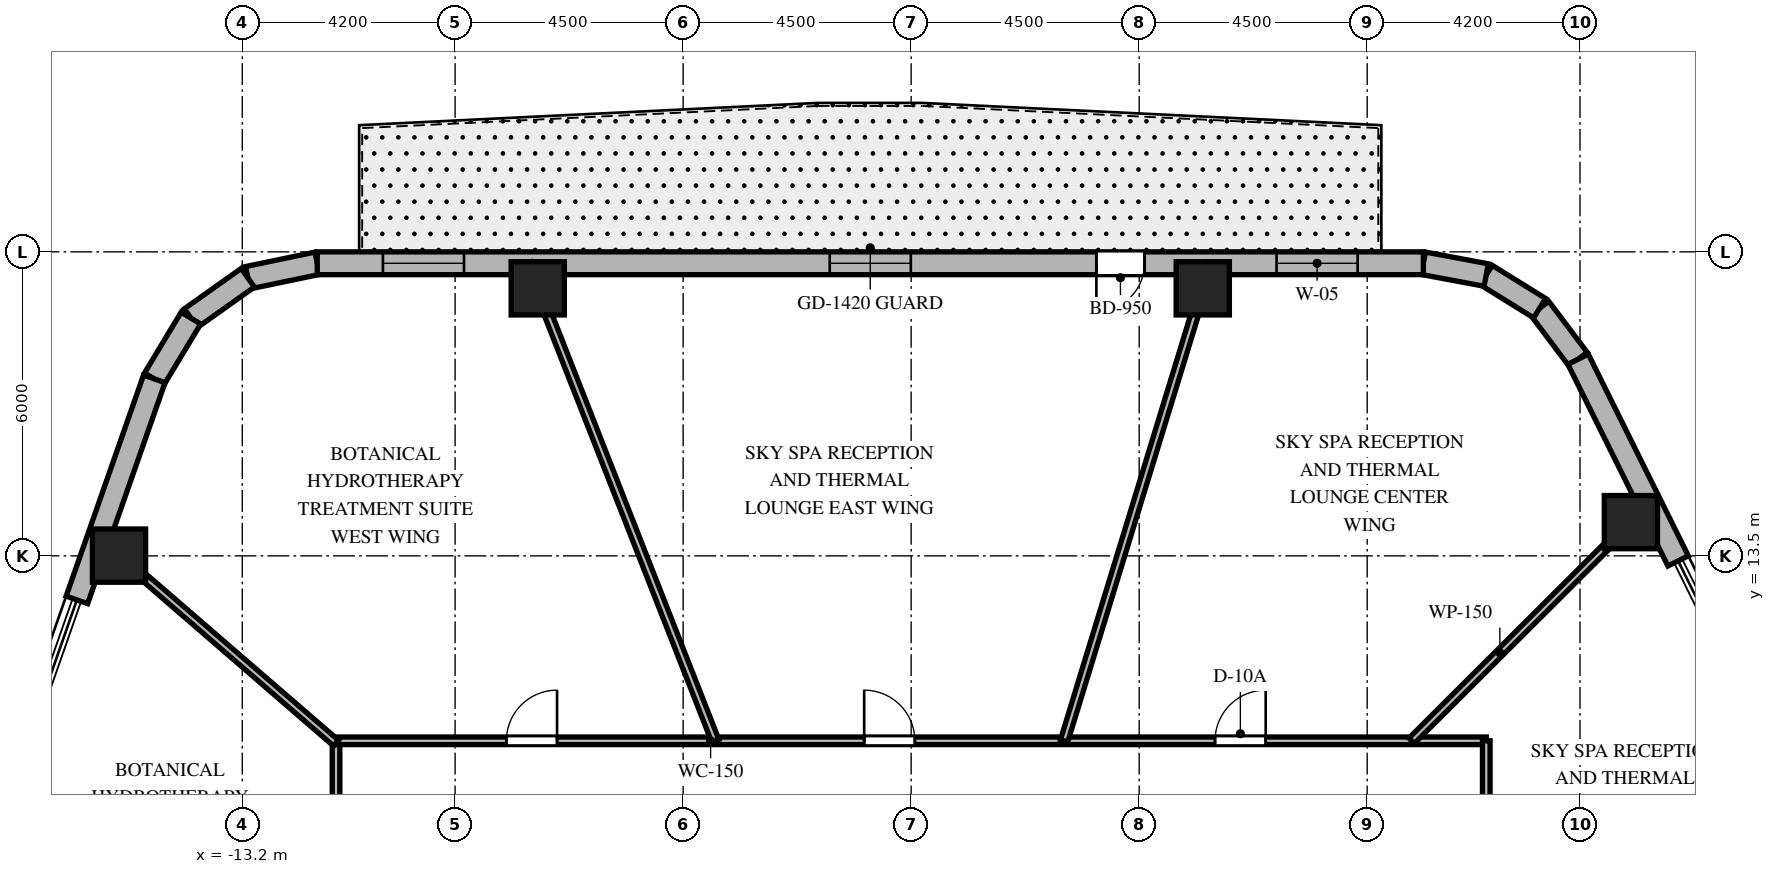
"""IFC4 building model, lengths in metres.
Left out: names, types, materials, properties, quantities, classifications, styles, units other than length and angle.
Written with IfcOpenShell. Run it as: python <this file> out.ifc"""

import sys

from ifc_helpers import new_model, si_unit, direction, frame, frame_2d, origin, origin_2d, place, context, subcontext, project, spatial, rectangle, extrude, element, fill, save


model = new_model("IFC4")
c1 = context("Model", 3, precision=1e-05, world=origin(), true_north=direction((0.0, 1.0)))
c2 = subcontext(c1, "Body", "Model", "MODEL_VIEW")
j1 = project(units=[si_unit("LENGTHUNIT", "METRE"), si_unit("PLANEANGLEUNIT", "RADIAN")], contexts=[c1])
p1 = place(None, origin())
s1 = spatial("IfcSite", under=j1, at=p1, CompositionType="ELEMENT")
p2 = place(p1, origin())
s2 = spatial("IfcBuilding", under=s1, at=p2, CompositionType="ELEMENT")
p3 = place(p2, frame((0.0, 0.0, 201.5)))
s3 = spatial("IfcBuildingStorey", under=s2, at=p3, CompositionType="ELEMENT", Elevation=201.5)
for number, where, z_axis, x_axis in (
    (1, (14.204, 14.166, 0.0), (0.0, 0.0, 1.0), (1.0, 0.0, 0.0)),
    (2, (5.755, 18.78, 0.0), (0.0, 0.0, 1.0), (1.0, 0.0, 0.0)),
    (3, (-7.369, 18.78, 0.0), (0.0, 0.0, 1.0), (1.0, 0.0, 0.0)),
    (4, (-15.633, 13.505, 0.0), (0.0, 0.0, 1.0), (1.0, 0.0, 0.0)),
):
    element("IfcColumn", number, at=place(p3, frame(where, z_axis=z_axis, x_axis=x_axis)), inside=s3, PredefinedType="COLUMN", context=c2, shape_type="SweptSolid", body=[
        extrude(rectangle(XDim=1.05, YDim=1.05, at=origin_2d()), origin(), (0.0, 0.0, 1.0), 5.0),
    ])
p4 = place(p3, frame((13.162, 17.381, 0.0), z_axis=(0.0, 0.0, 1.0), x_axis=(-0.601515770517, 0.798860925205, 0.0)))
e5 = element("IfcWall", 5, at=p4, inside=s3, PredefinedType="SOLIDWALL", context=c2, shape_type="SweptSolid", body=[
    extrude(rectangle(XDim=1.262, YDim=0.45, at=frame_2d((0.631, 0.0))), origin(), (0.0, 0.0, 1.0), 4.7),
])
p5 = place(p3, frame((12.403, 18.389, 0.0), z_axis=(0.0, 0.0, 1.0), x_axis=(-0.849795170926, 0.527113049991, 0.0)))
e6 = element("IfcWall", 6, at=p5, inside=s3, PredefinedType="SOLIDWALL", context=c2, shape_type="SweptSolid", body=[
    extrude(rectangle(XDim=1.241, YDim=0.45, at=frame_2d((0.62, 0.0))), origin(), (0.0, 0.0, 1.0), 4.7),
])
p6 = place(p3, frame((11.349, 19.043, 0.0), z_axis=(0.0, 0.0, 1.0), x_axis=(-0.982931267051, 0.183973161772, 0.0)))
e7 = element("IfcWall", 7, at=p6, inside=s3, PredefinedType="SOLIDWALL", context=c2, shape_type="SweptSolid", body=[
    extrude(rectangle(XDim=1.262, YDim=0.45, at=frame_2d((0.631, 0.0))), origin(), (0.0, 0.0, 1.0), 4.7),
])
p7 = place(p3, frame((-11.72, 19.275, 0.0), z_axis=(0.0, 0.0, 1.0), x_axis=(-0.97893106758, -0.204191001093, 0.0)))
e8 = element("IfcWall", 8, at=p7, inside=s3, PredefinedType="SOLIDWALL", context=c2, shape_type="SweptSolid", body=[
    extrude(rectangle(XDim=1.4, YDim=0.45, at=frame_2d((0.7, 0.0))), origin(), (0.0, 0.0, 1.0), 4.7),
])
p8 = place(p3, frame((-13.091, 18.989, 0.0), z_axis=(0.0, 0.0, 1.0), x_axis=(-0.815574637848, -0.578651890258, 0.0)))
e9 = element("IfcWall", 9, at=p8, inside=s3, PredefinedType="SOLIDWALL", context=c2, shape_type="SweptSolid", body=[
    extrude(rectangle(XDim=1.377, YDim=0.45, at=frame_2d((0.688, 0.0))), origin(), (0.0, 0.0, 1.0), 4.7),
])
p9 = place(p3, frame((-14.214, 18.192, 0.0), z_axis=(0.0, 0.0, 1.0), x_axis=(-0.516340945502, -0.856383108193, 0.0)))
e10 = element("IfcWall", 10, at=p9, inside=s3, PredefinedType="SOLIDWALL", context=c2, shape_type="SweptSolid", body=[
    extrude(rectangle(XDim=1.4, YDim=0.45, at=frame_2d((0.7, 0.0))), origin(), (0.0, 0.0, 1.0), 4.7),
])
p10 = place(p3, frame((15.136, 13.4, 0.0), z_axis=(0.0, 0.0, 1.0), x_axis=(-0.444243648127, 0.895906011308, 0.0)))
e11 = element("IfcWall", 11, at=p10, inside=s3, PredefinedType="SOLIDWALL", context=c2, shape_type="SweptSolid", body=[
    extrude(rectangle(XDim=4.443, YDim=0.45, at=frame_2d((2.221, 0.0))), origin(), (0.0, 0.0, 1.0), 4.7),
])
p11 = place(p3, frame((10.108, 19.275, 0.0), z_axis=(0.0, 0.0, 1.0), x_axis=(-1.0, 0.0, 0.0)))
e12 = element("IfcWall", 12, at=p11, inside=s3, PredefinedType="SOLIDWALL", context=c2, shape_type="SweptSolid", body=[
    extrude(rectangle(XDim=21.829, YDim=0.45, at=frame_2d((10.915, 0.0))), origin(), (0.0, 0.0, 1.0), 4.7),
])
p12 = place(p11, frame((5.503, 0.0, 0.0)))
e13 = element("IfcOpeningElement", 13, at=p12, cuts=e12, PredefinedType="OPENING", context=c2, shape_type="SweptSolid", body=[
    extrude(rectangle(XDim=0.95, YDim=2.15, at=frame_2d((0.475, 1.075))), frame((0.0, 0.235, 0.0), z_axis=(0.0, -1.0, 0.0), x_axis=(1.0, 0.0, 0.0)), (0.0, 0.0, 1.0), 0.47),
])
p13 = place(p11, frame((1.297, 0.0, 0.8)))
e14 = element("IfcOpeningElement", 14, at=p13, cuts=e12, PredefinedType="OPENING", context=c2, shape_type="SweptSolid", body=[
    extrude(rectangle(XDim=1.6, YDim=1.75, at=frame_2d((0.8, 0.875))), frame((0.0, 0.235, 0.0), z_axis=(0.0, -1.0, 0.0), x_axis=(1.0, 0.0, 0.0)), (0.0, 0.0, 1.0), 0.47),
])
p14 = place(p11, frame((10.115, 0.0, 0.8)))
e15 = element("IfcOpeningElement", 15, at=p14, cuts=e12, PredefinedType="OPENING", context=c2, shape_type="SweptSolid", body=[
    extrude(rectangle(XDim=1.6, YDim=1.75, at=frame_2d((0.8, 0.875))), frame((0.0, 0.235, 0.0), z_axis=(0.0, -1.0, 0.0), x_axis=(1.0, 0.0, 0.0)), (0.0, 0.0, 1.0), 0.47),
])
p15 = place(p11, frame((18.933, 0.0, 0.8)))
e16 = element("IfcOpeningElement", 16, at=p15, cuts=e12, PredefinedType="OPENING", context=c2, shape_type="SweptSolid", body=[
    extrude(rectangle(XDim=1.6, YDim=1.75, at=frame_2d((0.8, 0.875))), frame((0.0, 0.235, 0.0), z_axis=(0.0, -1.0, 0.0), x_axis=(1.0, 0.0, 0.0)), (0.0, 0.0, 1.0), 0.47),
])
p16 = place(p3, frame((-14.937, 16.993, 0.0), z_axis=(0.0, 0.0, 1.0), x_axis=(-0.330437475159, -0.943827884209, 0.0)))
e17 = element("IfcWall", 17, at=p16, inside=s3, PredefinedType="SOLIDWALL", context=c2, shape_type="SweptSolid", body=[
    extrude(rectangle(XDim=4.622, YDim=0.45, at=frame_2d((2.311, 0.0))), origin(), (0.0, 0.0, 1.0), 4.7),
])
p17 = place(p3, frame((-11.35, -9.85, 0.0), z_axis=(0.0, 0.0, 1.0), x_axis=(0.0, 1.0, 0.0)))
e18 = element("IfcWall", 18, at=p17, inside=s3, PredefinedType="PARTITIONING", context=c2, shape_type="SweptSolid", body=[
    extrude(rectangle(XDim=19.7, YDim=0.15, at=frame_2d((9.85, 0.0))), origin(), (0.0, 0.0, 1.0), 2.89),
])
p18 = place(p17, frame((15.183, 0.0, 0.0)))
e19 = element("IfcOpeningElement", 19, at=p18, cuts=e18, PredefinedType="OPENING", context=c2, shape_type="SweptSolid", body=[
    extrude(rectangle(XDim=1.0, YDim=2.03, at=frame_2d((0.5, 1.015))), frame((0.0, 0.085, 0.0), z_axis=(0.0, -1.0, 0.0), x_axis=(1.0, 0.0, 0.0)), (0.0, 0.0, 1.0), 0.17),
])
p19 = place(p17, frame((8.819, 0.0, 0.0)))
e20 = element("IfcOpeningElement", 20, at=p19, cuts=e18, PredefinedType="OPENING", context=c2, shape_type="SweptSolid", body=[
    extrude(rectangle(XDim=1.0, YDim=2.03, at=frame_2d((0.5, 1.015))), frame((0.0, 0.085, 0.0), z_axis=(0.0, -1.0, 0.0), x_axis=(1.0, 0.0, 0.0)), (0.0, 0.0, 1.0), 0.17),
])
p20 = place(p17, frame((2.989, 0.0, 0.0)))
e21 = element("IfcOpeningElement", 21, at=p20, cuts=e18, PredefinedType="OPENING", context=c2, shape_type="SweptSolid", body=[
    extrude(rectangle(XDim=1.0, YDim=2.03, at=frame_2d((0.5, 1.015))), frame((0.0, 0.085, 0.0), z_axis=(0.0, -1.0, 0.0), x_axis=(1.0, 0.0, 0.0)), (0.0, 0.0, 1.0), 0.17),
])
p21 = place(p3, frame((-11.35, 9.85, 0.0), z_axis=(0.0, 0.0, 1.0), x_axis=(1.0, 0.0, 0.0)))
e22 = element("IfcWall", 22, at=p21, inside=s3, PredefinedType="PARTITIONING", context=c2, shape_type="SweptSolid", body=[
    extrude(rectangle(XDim=22.7, YDim=0.15, at=frame_2d((11.35, 0.0))), origin(), (0.0, 0.0, 1.0), 2.89),
])
p22 = place(p21, frame((17.347, 0.0, 0.0)))
e23 = element("IfcOpeningElement", 23, at=p22, cuts=e22, PredefinedType="OPENING", context=c2, shape_type="SweptSolid", body=[
    extrude(rectangle(XDim=1.0, YDim=2.03, at=frame_2d((0.5, 1.015))), frame((0.0, 0.085, 0.0), z_axis=(0.0, -1.0, 0.0), x_axis=(1.0, 0.0, 0.0)), (0.0, 0.0, 1.0), 0.17),
])
p23 = place(p21, frame((10.423, 0.0, 0.0)))
e24 = element("IfcOpeningElement", 24, at=p23, cuts=e22, PredefinedType="OPENING", context=c2, shape_type="SweptSolid", body=[
    extrude(rectangle(XDim=1.0, YDim=2.03, at=frame_2d((0.5, 1.015))), frame((0.0, 0.085, 0.0), z_axis=(0.0, -1.0, 0.0), x_axis=(1.0, 0.0, 0.0)), (0.0, 0.0, 1.0), 0.17),
])
p24 = place(p21, frame((3.362, 0.0, 0.0)))
e25 = element("IfcOpeningElement", 25, at=p24, cuts=e22, PredefinedType="OPENING", context=c2, shape_type="SweptSolid", body=[
    extrude(rectangle(XDim=1.0, YDim=2.03, at=frame_2d((0.5, 1.015))), frame((0.0, 0.085, 0.0), z_axis=(0.0, -1.0, 0.0), x_axis=(1.0, 0.0, 0.0)), (0.0, 0.0, 1.0), 0.17),
])
p25 = place(p3, frame((11.35, 9.85, 0.0), z_axis=(0.0, 0.0, 1.0), x_axis=(0.0, -1.0, 0.0)))
e26 = element("IfcWall", 26, at=p25, inside=s3, PredefinedType="PARTITIONING", context=c2, shape_type="SweptSolid", body=[
    extrude(rectangle(XDim=19.7, YDim=0.15, at=frame_2d((9.85, 0.0))), origin(), (0.0, 0.0, 1.0), 2.89),
])
p26 = place(p25, frame((2.989, 0.0, 0.0)))
e27 = element("IfcOpeningElement", 27, at=p26, cuts=e26, PredefinedType="OPENING", context=c2, shape_type="SweptSolid", body=[
    extrude(rectangle(XDim=1.0, YDim=2.03, at=frame_2d((0.5, 1.015))), frame((0.0, 0.085, 0.0), z_axis=(0.0, -1.0, 0.0), x_axis=(1.0, 0.0, 0.0)), (0.0, 0.0, 1.0), 0.17),
])
p27 = place(p25, frame((15.183, 0.0, 0.0)))
e28 = element("IfcOpeningElement", 28, at=p27, cuts=e26, PredefinedType="OPENING", context=c2, shape_type="SweptSolid", body=[
    extrude(rectangle(XDim=1.0, YDim=2.03, at=frame_2d((0.5, 1.015))), frame((0.0, 0.085, 0.0), z_axis=(0.0, -1.0, 0.0), x_axis=(1.0, 0.0, 0.0)), (0.0, 0.0, 1.0), 0.17),
])
p28 = place(p25, frame((8.819, 0.0, 0.0)))
e29 = element("IfcOpeningElement", 29, at=p28, cuts=e26, PredefinedType="OPENING", context=c2, shape_type="SweptSolid", body=[
    extrude(rectangle(XDim=1.0, YDim=2.03, at=frame_2d((0.5, 1.015))), frame((0.0, 0.085, 0.0), z_axis=(0.0, -1.0, 0.0), x_axis=(1.0, 0.0, 0.0)), (0.0, 0.0, 1.0), 0.17),
])
p29 = place(p3, frame((9.876, 9.85, 0.0), z_axis=(0.0, 0.0, 1.0), x_axis=(0.708044623933, 0.706167692917, 0.0)))
e30 = element("IfcWall", 30, at=p29, inside=s3, PredefinedType="PARTITIONING", context=c2, shape_type="SweptSolid", body=[
    extrude(rectangle(XDim=6.634, YDim=0.15, at=frame_2d((3.317, 0.0))), origin(), (0.0, 0.0, 1.0), 2.89),
])
p30 = place(p3, frame((3.019, 9.85, 0.0), z_axis=(0.0, 0.0, 1.0), x_axis=(0.292996168014, 0.956113615387, 0.0)))
e31 = element("IfcWall", 31, at=p30, inside=s3, PredefinedType="PARTITIONING", context=c2, shape_type="SweptSolid", body=[
    extrude(rectangle(XDim=9.857, YDim=0.15, at=frame_2d((4.929, 0.0))), origin(), (0.0, 0.0, 1.0), 2.89),
])
p31 = place(p3, frame((-3.865, 9.85, 0.0), z_axis=(0.0, 0.0, 1.0), x_axis=(-0.365279308356, 0.930897968033, 0.0)))
e32 = element("IfcWall", 32, at=p31, inside=s3, PredefinedType="PARTITIONING", context=c2, shape_type="SweptSolid", body=[
    extrude(rectangle(XDim=10.125, YDim=0.15, at=frame_2d((5.062, 0.0))), origin(), (0.0, 0.0, 1.0), 2.89),
])
p32 = place(p3, frame((-11.35, 9.805, 0.0), z_axis=(0.0, 0.0, 1.0), x_axis=(-0.75671839422, 0.653740982232, 0.0)))
e33 = element("IfcWall", 33, at=p32, inside=s3, PredefinedType="PARTITIONING", context=c2, shape_type="SweptSolid", body=[
    extrude(rectangle(XDim=6.193, YDim=0.15, at=frame_2d((3.096, 0.0))), origin(), (0.0, 0.0, 1.0), 2.89),
])
p33 = place(p12, origin())
e34 = element("IfcDoor", 34, at=p33, inside=s3, OperationType="SINGLE_SWING_RIGHT", PredefinedType="DOOR", context=c2, shape_type="SweptSolid", body=[
    extrude(rectangle(XDim=0.95, YDim=2.15, at=frame_2d((0.475, 1.075))), frame((0.0, 0.025, 0.0), z_axis=(0.0, -1.0, 0.0), x_axis=(1.0, 0.0, 0.0)), (0.0, 0.0, 1.0), 0.05),
])
fill(e13, e34)
p34 = place(p13, origin())
e35 = element("IfcWindow", 35, at=p34, inside=s3, PartitioningType="SINGLE_PANEL", PredefinedType="WINDOW", context=c2, shape_type="SweptSolid", body=[
    extrude(rectangle(XDim=1.6, YDim=1.75, at=frame_2d((0.8, 0.875))), frame((0.0, 0.03, 0.0), z_axis=(0.0, -1.0, 0.0), x_axis=(1.0, 0.0, 0.0)), (0.0, 0.0, 1.0), 0.06),
])
fill(e14, e35)
p35 = place(p14, origin())
e36 = element("IfcWindow", 36, at=p35, inside=s3, PartitioningType="SINGLE_PANEL", PredefinedType="WINDOW", context=c2, shape_type="SweptSolid", body=[
    extrude(rectangle(XDim=1.6, YDim=1.75, at=frame_2d((0.8, 0.875))), frame((0.0, 0.03, 0.0), z_axis=(0.0, -1.0, 0.0), x_axis=(1.0, 0.0, 0.0)), (0.0, 0.0, 1.0), 0.06),
])
fill(e15, e36)
p36 = place(p15, origin())
e37 = element("IfcWindow", 37, at=p36, inside=s3, PartitioningType="SINGLE_PANEL", PredefinedType="WINDOW", context=c2, shape_type="SweptSolid", body=[
    extrude(rectangle(XDim=1.6, YDim=1.75, at=frame_2d((0.8, 0.875))), frame((0.0, 0.03, 0.0), z_axis=(0.0, -1.0, 0.0), x_axis=(1.0, 0.0, 0.0)), (0.0, 0.0, 1.0), 0.06),
])
fill(e16, e37)
p37 = place(p22, origin())
e38 = element("IfcDoor", 38, at=p37, inside=s3, OperationType="SINGLE_SWING_RIGHT", PredefinedType="DOOR", context=c2, shape_type="SweptSolid", body=[
    extrude(rectangle(XDim=1.0, YDim=2.03, at=frame_2d((0.5, 1.015))), frame((0.0, 0.025, 0.0), z_axis=(0.0, -1.0, 0.0), x_axis=(1.0, 0.0, 0.0)), (0.0, 0.0, 1.0), 0.05),
])
fill(e23, e38)
p38 = place(p23, origin())
e39 = element("IfcDoor", 39, at=p38, inside=s3, OperationType="SINGLE_SWING_LEFT", PredefinedType="DOOR", context=c2, shape_type="SweptSolid", body=[
    extrude(rectangle(XDim=1.0, YDim=2.03, at=frame_2d((0.5, 1.015))), frame((0.0, 0.025, 0.0), z_axis=(0.0, -1.0, 0.0), x_axis=(1.0, 0.0, 0.0)), (0.0, 0.0, 1.0), 0.05),
])
fill(e24, e39)
p39 = place(p24, origin())
e40 = element("IfcDoor", 40, at=p39, inside=s3, OperationType="SINGLE_SWING_RIGHT", PredefinedType="DOOR", context=c2, shape_type="SweptSolid", body=[
    extrude(rectangle(XDim=1.0, YDim=2.03, at=frame_2d((0.5, 1.015))), frame((0.0, 0.025, 0.0), z_axis=(0.0, -1.0, 0.0), x_axis=(1.0, 0.0, 0.0)), (0.0, 0.0, 1.0), 0.05),
])
fill(e25, e40)
save(model, sys.argv[1])
